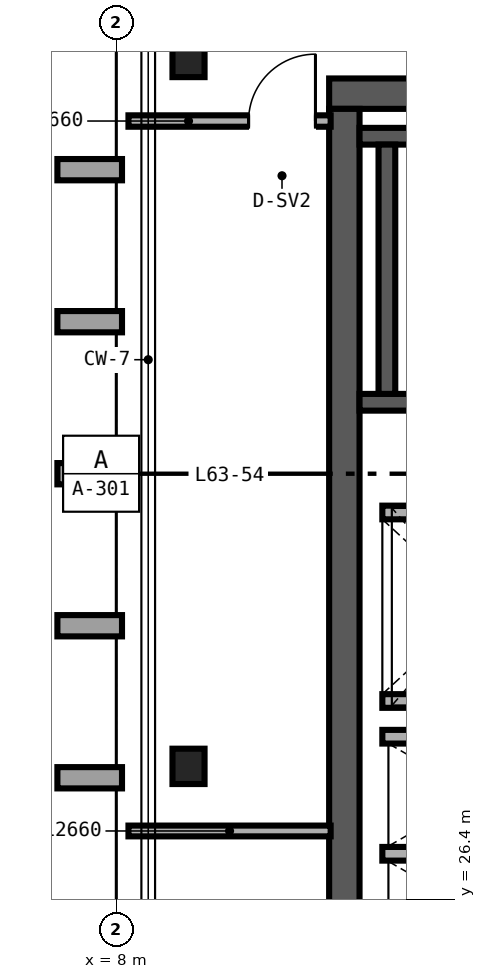
"""IFC4 building model, lengths in metres.
Left out: names, types, materials, properties, quantities, classifications, styles, units other than length and angle.
Written with IfcOpenShell. Run it as: python <this file> out.ifc"""

import sys

from ifc_helpers import new_model, si_unit, direction, frame, frame_2d, origin, origin_2d, place, context, subcontext, project, spatial, rectangle, i_section, extrude, source, transform, mapped, element, fill, save


model = new_model("IFC4")
c1 = context("Model", 3, precision=1e-05, world=origin(), true_north=direction((0.0, 1.0)))
c2 = subcontext(c1, "Body", "Model", "MODEL_VIEW")
j1 = project(units=[si_unit("LENGTHUNIT", "METRE"), si_unit("PLANEANGLEUNIT", "RADIAN")], contexts=[c1])
p1 = place(None, origin())
s1 = spatial("IfcSite", under=j1, at=p1, CompositionType="ELEMENT")
p2 = place(p1, origin())
s2 = spatial("IfcBuilding", under=s1, at=p2, CompositionType="ELEMENT")
p3 = place(p2, frame((0.0, 0.0, 250.8)))
s3 = spatial("IfcBuildingStorey", under=s2, at=p3, CompositionType="ELEMENT", Elevation=250.8)
p4 = place(p3, frame((10.8, 37.0, 0.0), z_axis=(0.0, 0.0, 1.0), x_axis=(1.0, 0.0, 0.0)))
e1 = element("IfcWall", 1, at=p4, inside=s3, PredefinedType="SHEAR", context=c2, shape_type="SweptSolid", body=[
    extrude(rectangle(XDim=12.4, YDim=0.4, at=frame_2d((6.2, 0.0))), origin(), (0.0, 0.0, 1.0), 3.38),
])
p5 = place(p4, frame((10.3, 0.0, 0.0)))
e2 = element("IfcOpeningElement", 2, at=p5, cuts=e1, PredefinedType="OPENING", context=c2, shape_type="SweptSolid", body=[
    extrude(rectangle(XDim=1.0, YDim=2.15, at=frame_2d((0.5, 1.075))), frame((0.0, 0.21, 0.0), z_axis=(0.0, -1.0, 0.0), x_axis=(1.0, 0.0, 0.0)), (0.0, 0.0, 1.0), 0.42),
])
p6 = place(p3, frame((11.0, 15.2, 0.0), z_axis=(0.0, 0.0, 1.0), x_axis=(0.0, 1.0, 0.0)))
e3 = element("IfcWall", 3, at=p6, inside=s3, PredefinedType="SHEAR", context=c2, shape_type="SweptSolid", body=[
    extrude(rectangle(XDim=21.6, YDim=0.4, at=frame_2d((10.8, 0.0))), origin(), (0.0, 0.0, 1.0), 3.38),
])
p7 = place(p3, frame((11.2, 32.94, 0.0), z_axis=(0.0, 0.0, 1.0), x_axis=(1.0, 0.0, 0.0)))
e4 = element("IfcWall", 4, at=p7, inside=s3, PredefinedType="SHEAR", context=c2, shape_type="SweptSolid", body=[
    extrude(rectangle(XDim=8.11, YDim=0.22, at=frame_2d((4.055, 0.0))), origin(), (0.0, 0.0, 1.0), 3.4),
])
p8 = place(p7, frame((0.72, 0.0, 0.0)))
e5 = element("IfcOpeningElement", 5, at=p8, cuts=e4, PredefinedType="OPENING", context=c2, shape_type="SweptSolid", body=[
    extrude(rectangle(XDim=1.05, YDim=2.15, at=frame_2d((0.525, 1.075))), frame((0.0, 0.12, 0.0), z_axis=(0.0, -1.0, 0.0), x_axis=(1.0, 0.0, 0.0)), (0.0, 0.0, 1.0), 0.24),
])
p9 = place(p3, frame((11.2, 36.44, 0.0), z_axis=(0.0, 0.0, 1.0), x_axis=(1.0, 0.0, 0.0)))
e6 = element("IfcWall", 6, at=p9, inside=s3, PredefinedType="SHEAR", context=c2, shape_type="SweptSolid", body=[
    extrude(rectangle(XDim=8.11, YDim=0.22, at=frame_2d((4.055, 0.0))), origin(), (0.0, 0.0, 1.0), 3.4),
])
p10 = place(p3, frame((11.56, 33.05, 0.0), z_axis=(0.0, 0.0, 1.0), x_axis=(0.0, 1.0, 0.0)))
e7 = element("IfcWall", 7, at=p10, inside=s3, PredefinedType="SHEAR", context=c2, shape_type="SweptSolid", body=[
    extrude(rectangle(XDim=3.28, YDim=0.22, at=frame_2d((1.64, 0.0))), origin(), (0.0, 0.0, 1.0), 3.4),
])
m1 = source(origin(), c2, "Body", "SweptSolid", [
    extrude(i_section(OverallWidth=0.422, OverallDepth=0.465, WebThickness=0.045, FlangeThickness=0.073, FilletRadius=0.025, at=origin_2d()), origin(), (0.0, 0.0, 1.0), 3.38),
])
for number, where, z_axis, x_axis in (
    (8, (8.95, 28.15, 0.0), (0.0, 0.0, 1.0), (1.0, 0.0, 0.0)),
    (9, (8.95, 37.45, 0.0), (0.0, 0.0, 1.0), (1.0, 0.0, 0.0)),
):
    element("IfcColumn", number, at=place(p3, frame(where, z_axis=z_axis, x_axis=x_axis)), inside=s3, PredefinedType="COLUMN", context=c2, shape_type="MappedRepresentation", body=[
        mapped(m1, transform((0.0, 0.0, 0.0), scale=1.0)),
    ])
for number, where, z_axis, x_axis in (
    (10, (11.5, 29.01, 0.0), (0.0, 0.0, 1.0), (1.0, 0.0, 0.0)),
    (11, (11.5, 31.49, 0.0), (0.0, 0.0, 1.0), (1.0, 0.0, 0.0)),
):
    element("IfcWall", number, at=place(p3, frame(where, z_axis=z_axis, x_axis=x_axis)), inside=s3, PredefinedType="SOLIDWALL", context=c2, shape_type="SweptSolid", body=[
        extrude(rectangle(XDim=2.5, YDim=0.18, at=frame_2d((1.25, 0.0))), origin(), (0.0, 0.0, 1.0), 3.38),
    ])
for number, where, z_axis, x_axis in (
    (12, (11.5, 27.0, 0.0), (0.0, 0.0, 1.0), (1.0, 0.0, 0.0)),
    (13, (11.5, 28.54, 0.0), (0.0, 0.0, 1.0), (1.0, 0.0, 0.0)),
):
    element("IfcWall", number, at=place(p3, frame(where, z_axis=z_axis, x_axis=x_axis)), inside=s3, PredefinedType="SOLIDWALL", context=c2, shape_type="SweptSolid", body=[
        extrude(rectangle(XDim=2.51, YDim=0.18, at=frame_2d((1.255, 0.0))), origin(), (0.0, 0.0, 1.0), 3.38),
    ])
p11 = place(p3, frame((8.16, 36.64, 0.0), z_axis=(0.0, 0.0, 1.0), x_axis=(1.0, 0.0, 0.0)))
e14 = element("IfcWall", 14, at=p11, inside=s3, PredefinedType="PARTITIONING", context=c2, shape_type="SweptSolid", body=[
    extrude(rectangle(XDim=2.66, YDim=0.15, at=frame_2d((1.33, 0.0))), origin(), (0.0, 0.0, 1.0), 2.763),
])
p12 = place(p11, frame((1.58, 0.0, 0.0)))
e15 = element("IfcOpeningElement", 15, at=p12, cuts=e14, PredefinedType="OPENING", context=c2, shape_type="SweptSolid", body=[
    extrude(rectangle(XDim=0.88, YDim=2.15, at=frame_2d((0.44, 1.075))), frame((0.0, 0.085, 0.0), z_axis=(0.0, -1.0, 0.0), x_axis=(1.0, 0.0, 0.0)), (0.0, 0.0, 1.0), 0.17),
])
p13 = place(p3, frame((8.16, 27.3, 0.0), z_axis=(0.0, 0.0, 1.0), x_axis=(1.0, 0.0, 0.0)))
e16 = element("IfcWall", 16, at=p13, inside=s3, PredefinedType="PARTITIONING", context=c2, shape_type="SweptSolid", body=[
    extrude(rectangle(XDim=2.66, YDim=0.142, at=frame_2d((1.33, 0.0))), origin(), (0.0, 0.0, 1.0), 2.601),
])
m2 = source(origin(), c2, "Body", "SweptSolid", [
    extrude(rectangle(XDim=0.88, YDim=2.15, at=frame_2d((0.44, 1.075))), frame((0.0, 0.025, 0.0), z_axis=(0.0, -1.0, 0.0), x_axis=(1.0, 0.0, 0.0)), (0.0, 0.0, 1.0), 0.05),
])
p14 = place(p12, origin())
e17 = element("IfcDoor", 17, at=p14, inside=s3, OperationType="SINGLE_SWING_RIGHT", PredefinedType="DOOR", context=c2, shape_type="MappedRepresentation", body=[
    mapped(m2, transform((0.0, 0.0, 0.0), scale=1.0)),
])
fill(e15, e17)
save(model, sys.argv[1])
